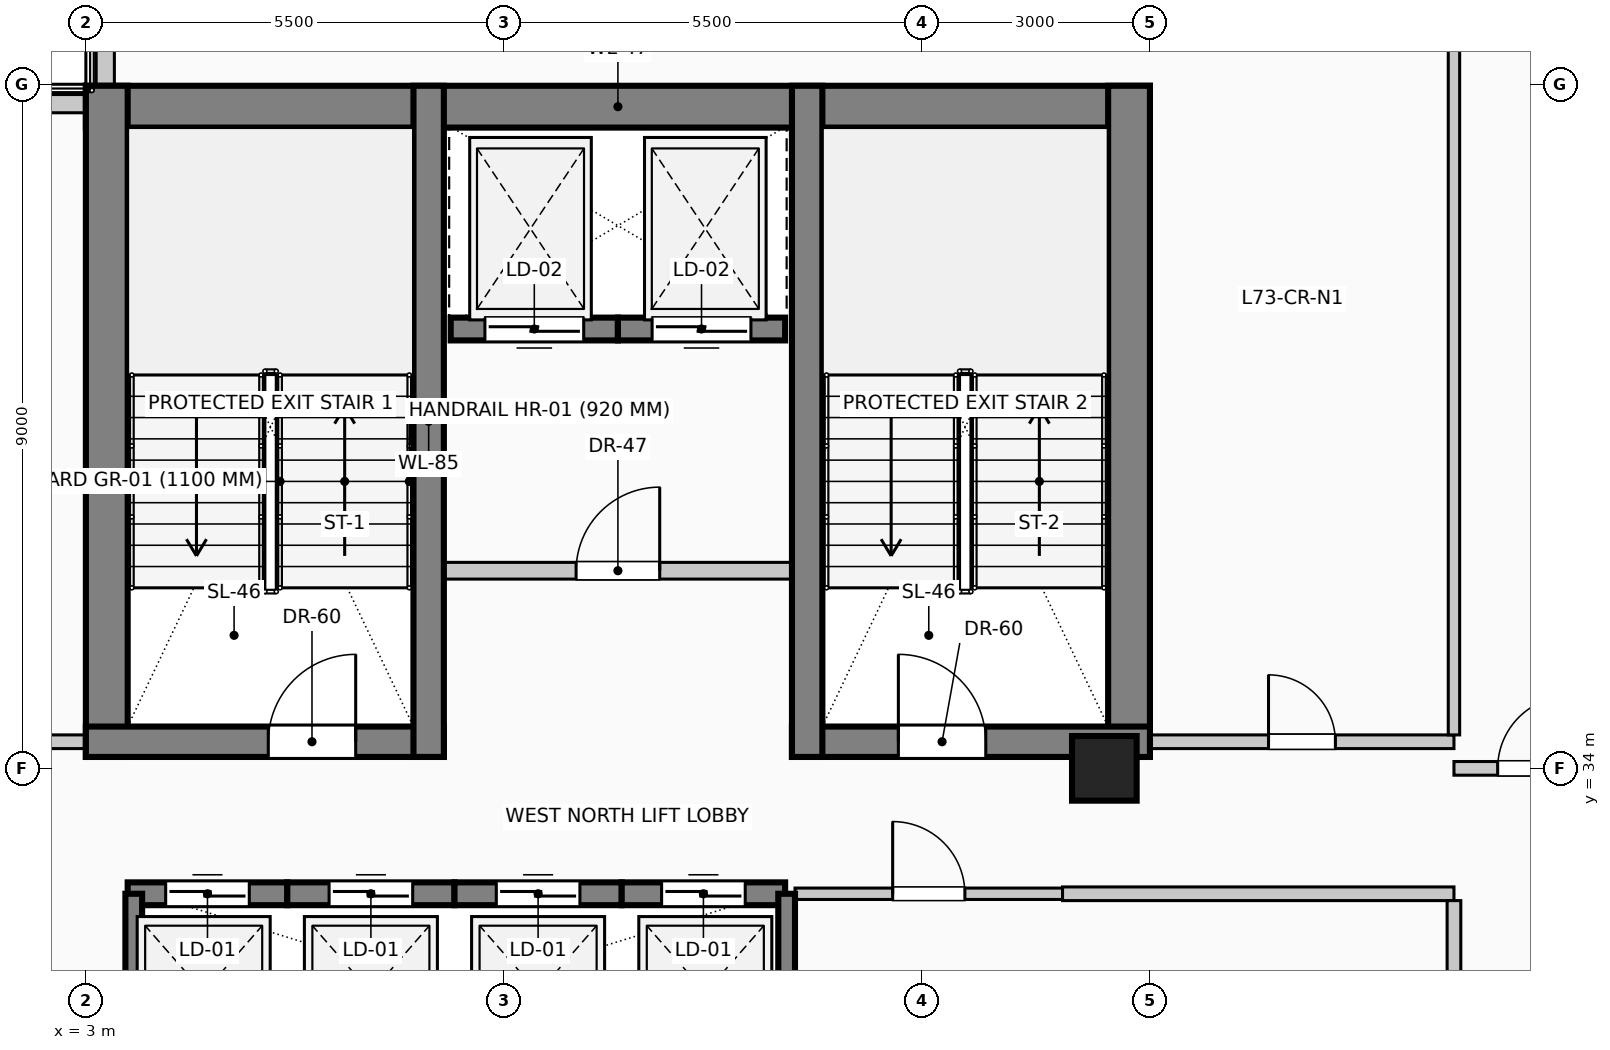
"""IFC4 building model, lengths in metres.
Left out: names, types, materials, properties, quantities, classifications, styles, units other than length and angle.
Written with IfcOpenShell. Run it as: python <this file> out.ifc"""

import sys

from ifc_helpers import new_model, si_unit, direction, frame, frame_2d, origin, origin_2d, place, context, subcontext, project, spatial, rectangle, circle, extrude, element, fill, save


model = new_model("IFC4")
c1 = context("Model", 3, precision=1e-05, world=origin(), true_north=direction((0.0, 1.0)))
c2 = subcontext(c1, "Body", "Model", "MODEL_VIEW")
j1 = project(units=[si_unit("LENGTHUNIT", "METRE"), si_unit("PLANEANGLEUNIT", "RADIAN")], contexts=[c1])
p1 = place(None, origin())
s1 = spatial("IfcSite", under=j1, at=p1, CompositionType="ELEMENT")
p2 = place(p1, origin())
s2 = spatial("IfcBuilding", under=s1, at=p2, CompositionType="ELEMENT")
p3 = place(p2, frame((0.0, 0.0, 301.0)))
s3 = spatial("IfcBuildingStorey", under=s2, at=p3, CompositionType="ELEMENT", Elevation=301.0)
p4 = place(p3, frame((3.0, 42.705, 0.0), z_axis=(0.0, 0.0, 1.0), x_axis=(1.0, 0.0, 0.0)))
e1 = element("IfcWall", 1, at=p4, inside=s3, PredefinedType="SHEAR", context=c2, shape_type="SweptSolid", body=[
    extrude(rectangle(XDim=14.0, YDim=0.55, at=frame_2d((7.0, 0.0))), origin(), (0.0, 0.0, 1.0), 4.0),
])
for number, where, z_axis, x_axis in (
    (2, (3.275, 34.15, 0.0), (0.0, 0.0, 1.0), (0.0, 1.0, 0.0)),
    (3, (16.725, 34.15, 0.0), (0.0, 0.0, 1.0), (0.0, 1.0, 0.0)),
):
    element("IfcWall", number, at=place(p3, frame(where, z_axis=z_axis, x_axis=x_axis)), inside=s3, PredefinedType="SHEAR", context=c2, shape_type="SweptSolid", body=[
        extrude(rectangle(XDim=8.83, YDim=0.55, at=frame_2d((4.415, 0.0))), origin(), (0.0, 0.0, 1.0), 4.0),
    ])
p5 = place(p3, frame((3.0, 34.35, 0.0), z_axis=(0.0, 0.0, 1.0), x_axis=(1.0, 0.0, 0.0)))
e4 = element("IfcWall", 4, at=p5, inside=s3, PredefinedType="SHEAR", context=c2, shape_type="SweptSolid", body=[
    extrude(rectangle(XDim=4.71, YDim=0.4, at=frame_2d((2.355, 0.0))), origin(), (0.0, 0.0, 1.0), 4.0),
])
p6 = place(p5, frame((2.4, 0.0, 0.0)))
e5 = element("IfcOpeningElement", 5, at=p6, cuts=e4, PredefinedType="OPENING", context=c2, shape_type="SweptSolid", body=[
    extrude(rectangle(XDim=1.15, YDim=2.2, at=frame_2d((0.575, 1.1))), frame((0.0, 0.21, 0.0), z_axis=(0.0, -1.0, 0.0), x_axis=(1.0, 0.0, 0.0)), (0.0, 0.0, 1.0), 0.42),
])
p7 = place(p3, frame((12.29, 34.35, 0.0), z_axis=(0.0, 0.0, 1.0), x_axis=(1.0, 0.0, 0.0)))
e6 = element("IfcWall", 6, at=p7, inside=s3, PredefinedType="SHEAR", context=c2, shape_type="SweptSolid", body=[
    extrude(rectangle(XDim=4.71, YDim=0.4, at=frame_2d((2.355, 0.0))), origin(), (0.0, 0.0, 1.0), 4.0),
])
p8 = place(p7, frame((1.4, 0.0, 0.0)))
e7 = element("IfcOpeningElement", 7, at=p8, cuts=e6, PredefinedType="OPENING", context=c2, shape_type="SweptSolid", body=[
    extrude(rectangle(XDim=1.15, YDim=2.2, at=frame_2d((0.575, 1.1))), frame((0.0, 0.21, 0.0), z_axis=(0.0, -1.0, 0.0), x_axis=(1.0, 0.0, 0.0)), (0.0, 0.0, 1.0), 0.42),
])
for number, where, z_axis, x_axis in (
    (8, (7.51, 34.15, 0.0), (0.0, 0.0, 1.0), (0.0, 1.0, 0.0)),
    (9, (12.49, 34.15, 0.0), (0.0, 0.0, 1.0), (0.0, 1.0, 0.0)),
):
    element("IfcWall", number, at=place(p3, frame(where, z_axis=z_axis, x_axis=x_axis)), inside=s3, PredefinedType="SHEAR", context=c2, shape_type="SweptSolid", body=[
        extrude(rectangle(XDim=8.83, YDim=0.4, at=frame_2d((4.415, 0.0))), origin(), (0.0, 0.0, 1.0), 4.0),
    ])
p9 = place(p3, frame((16.4, 34.0, 0.0), z_axis=(0.0, 0.0, 1.0), x_axis=(1.0, 0.0, 0.0)))
e10 = element("IfcColumn", 10, at=p9, inside=s3, PredefinedType="COLUMN", context=c2, shape_type="SweptSolid", body=[
    extrude(circle(Radius=0.425, at=origin_2d()), origin(), (0.0, 0.0, 1.0), 4.0),
])
p10 = place(p3, frame((0.6, 42.745, 0.0), z_axis=(0.0, 0.0, 1.0), x_axis=(1.0, 0.0, 0.0)))
e11 = element("IfcWall", 11, at=p10, inside=s3, PredefinedType="SOLIDWALL", context=c2, shape_type="SweptSolid", body=[
    extrude(rectangle(XDim=2.395, YDim=0.24, at=frame_2d((1.198, 0.0))), origin(), (0.0, 0.0, 1.0), 3.775),
])
p11 = place(p3, frame((3.255, 42.985, 0.0), z_axis=(0.0, 0.0, 1.0), x_axis=(0.0, 1.0, 0.0)))
e12 = element("IfcWall", 12, at=p11, inside=s3, PredefinedType="SOLIDWALL", context=c2, shape_type="SweptSolid", body=[
    extrude(rectangle(XDim=2.415, YDim=0.24, at=frame_2d((1.208, 0.0))), origin(), (0.0, 0.0, 1.0), 3.775),
])
p12 = place(p3, frame((3.55, 32.35, 0.0), z_axis=(0.0, 0.0, 1.0), x_axis=(1.0, 0.0, 0.0)))
e13 = element("IfcWall", 13, at=p12, inside=s3, PredefinedType="SOLIDWALL", context=c2, shape_type="SweptSolid", body=[
    extrude(rectangle(XDim=2.1, YDim=0.3, at=frame_2d((1.05, 0.0))), origin(), (0.0, 0.0, 1.0), 4.0),
])
p13 = place(p12, frame((0.5, 0.0, 0.0)))
e14 = element("IfcOpeningElement", 14, at=p13, cuts=e13, PredefinedType="OPENING", context=c2, shape_type="SweptSolid", body=[
    extrude(rectangle(XDim=1.1, YDim=2.2, at=frame_2d((0.55, 1.1))), frame((0.0, 0.16, 0.0), z_axis=(0.0, -1.0, 0.0), x_axis=(1.0, 0.0, 0.0)), (0.0, 0.0, 1.0), 0.32),
])
p14 = place(p3, frame((5.65, 32.35, 0.0), z_axis=(0.0, 0.0, 1.0), x_axis=(1.0, 0.0, 0.0)))
e15 = element("IfcWall", 15, at=p14, inside=s3, PredefinedType="SOLIDWALL", context=c2, shape_type="SweptSolid", body=[
    extrude(rectangle(XDim=2.2, YDim=0.3, at=frame_2d((1.1, 0.0))), origin(), (0.0, 0.0, 1.0), 4.0),
])
p15 = place(p14, frame((0.55, 0.0, 0.0)))
e16 = element("IfcOpeningElement", 16, at=p15, cuts=e15, PredefinedType="OPENING", context=c2, shape_type="SweptSolid", body=[
    extrude(rectangle(XDim=1.1, YDim=2.2, at=frame_2d((0.55, 1.1))), frame((0.0, 0.16, 0.0), z_axis=(0.0, -1.0, 0.0), x_axis=(1.0, 0.0, 0.0)), (0.0, 0.0, 1.0), 0.32),
])
p16 = place(p3, frame((7.85, 32.35, 0.0), z_axis=(0.0, 0.0, 1.0), x_axis=(1.0, 0.0, 0.0)))
e17 = element("IfcWall", 17, at=p16, inside=s3, PredefinedType="SOLIDWALL", context=c2, shape_type="SweptSolid", body=[
    extrude(rectangle(XDim=2.2, YDim=0.3, at=frame_2d((1.1, 0.0))), origin(), (0.0, 0.0, 1.0), 4.0),
])
p17 = place(p16, frame((0.55, 0.0, 0.0)))
e18 = element("IfcOpeningElement", 18, at=p17, cuts=e17, PredefinedType="OPENING", context=c2, shape_type="SweptSolid", body=[
    extrude(rectangle(XDim=1.1, YDim=2.2, at=frame_2d((0.55, 1.1))), frame((0.0, 0.16, 0.0), z_axis=(0.0, -1.0, 0.0), x_axis=(1.0, 0.0, 0.0)), (0.0, 0.0, 1.0), 0.32),
])
p18 = place(p3, frame((10.05, 32.35, 0.0), z_axis=(0.0, 0.0, 1.0), x_axis=(1.0, 0.0, 0.0)))
e19 = element("IfcWall", 19, at=p18, inside=s3, PredefinedType="SOLIDWALL", context=c2, shape_type="SweptSolid", body=[
    extrude(rectangle(XDim=2.15, YDim=0.3, at=frame_2d((1.075, 0.0))), origin(), (0.0, 0.0, 1.0), 4.0),
])
p19 = place(p18, frame((0.525, 0.0, 0.0)))
e20 = element("IfcOpeningElement", 20, at=p19, cuts=e19, PredefinedType="OPENING", context=c2, shape_type="SweptSolid", body=[
    extrude(rectangle(XDim=1.1, YDim=2.2, at=frame_2d((0.55, 1.1))), frame((0.0, 0.16, 0.0), z_axis=(0.0, -1.0, 0.0), x_axis=(1.0, 0.0, 0.0)), (0.0, 0.0, 1.0), 0.32),
])
p20 = place(p3, frame((10.0, 39.78, 0.0), z_axis=(0.0, 0.0, 1.0), x_axis=(-1.0, 0.0, 0.0)))
e21 = element("IfcWall", 21, at=p20, inside=s3, PredefinedType="SOLIDWALL", context=c2, shape_type="SweptSolid", body=[
    extrude(rectangle(XDim=2.2, YDim=0.3, at=frame_2d((1.1, 0.0))), origin(), (0.0, 0.0, 1.0), 4.0),
])
p21 = place(p20, frame((0.45, 0.0, 0.0)))
e22 = element("IfcOpeningElement", 22, at=p21, cuts=e21, PredefinedType="OPENING", context=c2, shape_type="SweptSolid", body=[
    extrude(rectangle(XDim=1.3, YDim=2.25, at=frame_2d((0.65, 1.125))), frame((0.0, 0.16, 0.0), z_axis=(0.0, -1.0, 0.0), x_axis=(1.0, 0.0, 0.0)), (0.0, 0.0, 1.0), 0.32),
])
p22 = place(p3, frame((12.2, 39.78, 0.0), z_axis=(0.0, 0.0, 1.0), x_axis=(-1.0, 0.0, 0.0)))
e23 = element("IfcWall", 23, at=p22, inside=s3, PredefinedType="SOLIDWALL", context=c2, shape_type="SweptSolid", body=[
    extrude(rectangle(XDim=2.2, YDim=0.3, at=frame_2d((1.1, 0.0))), origin(), (0.0, 0.0, 1.0), 4.0),
])
p23 = place(p22, frame((0.45, 0.0, 0.0)))
e24 = element("IfcOpeningElement", 24, at=p23, cuts=e23, PredefinedType="OPENING", context=c2, shape_type="SweptSolid", body=[
    extrude(rectangle(XDim=1.3, YDim=2.25, at=frame_2d((0.65, 1.125))), frame((0.0, 0.16, 0.0), z_axis=(0.0, -1.0, 0.0), x_axis=(1.0, 0.0, 0.0)), (0.0, 0.0, 1.0), 0.32),
])
p24 = place(p3, frame((3.63, 26.8, 0.0), z_axis=(0.0, 0.0, 1.0), x_axis=(0.0, 1.0, 0.0)))
e25 = element("IfcWall", 25, at=p24, inside=s3, PredefinedType="SOLIDWALL", context=c2, shape_type="SweptSolid", body=[
    extrude(rectangle(XDim=5.55, YDim=0.22, at=frame_2d((2.775, 0.0))), origin(), (0.0, 0.0, 1.0), 4.0),
])
p25 = place(p3, frame((12.22, 29.75, 0.0), z_axis=(0.0, 0.0, 1.0), x_axis=(0.0, 1.0, 0.0)))
e26 = element("IfcWall", 26, at=p25, inside=s3, PredefinedType="SOLIDWALL", context=c2, shape_type="SweptSolid", body=[
    extrude(rectangle(XDim=2.6, YDim=0.22, at=frame_2d((1.3, 0.0))), origin(), (0.0, 0.0, 1.0), 4.0),
])
p26 = place(p3, frame((7.51, 36.6, 0.0), z_axis=(0.0, 0.0, 1.0), x_axis=(1.0, 0.0, 0.0)))
e27 = element("IfcWall", 27, at=p26, inside=s3, PredefinedType="PARTITIONING", context=c2, shape_type="SweptSolid", body=[
    extrude(rectangle(XDim=4.98, YDim=0.22, at=frame_2d((2.49, 0.0))), origin(), (0.0, 0.0, 1.0), 3.775),
])
p27 = place(p26, frame((1.94, 0.0, 0.0)))
e28 = element("IfcOpeningElement", 28, at=p27, cuts=e27, PredefinedType="OPENING", context=c2, shape_type="SweptSolid", body=[
    extrude(rectangle(XDim=1.1, YDim=2.2, at=frame_2d((0.55, 1.1))), frame((0.0, 0.12, 0.0), z_axis=(0.0, -1.0, 0.0), x_axis=(1.0, 0.0, 0.0)), (0.0, 0.0, 1.0), 0.24),
])
p28 = place(p3, frame((12.33, 32.35, 0.0), z_axis=(0.0, 0.0, 1.0), x_axis=(1.0, 0.0, 0.0)))
e29 = element("IfcWall", 29, at=p28, inside=s3, PredefinedType="PARTITIONING", context=c2, shape_type="SweptSolid", body=[
    extrude(rectangle(XDim=3.52, YDim=0.15, at=frame_2d((1.76, 0.0))), origin(), (0.0, 0.0, 1.0), 3.775),
])
p29 = place(p28, frame((1.285, 0.0, 0.0)))
e30 = element("IfcOpeningElement", 30, at=p29, cuts=e29, PredefinedType="OPENING", context=c2, shape_type="SweptSolid", body=[
    extrude(rectangle(XDim=0.95, YDim=2.15, at=frame_2d((0.475, 1.075))), frame((0.0, 0.085, 0.0), z_axis=(0.0, -1.0, 0.0), x_axis=(1.0, 0.0, 0.0)), (0.0, 0.0, 1.0), 0.17),
])
p30 = place(p3, frame((15.85, 32.35, 0.0), z_axis=(0.0, 0.0, 1.0), x_axis=(1.0, 0.0, 0.0)))
e31 = element("IfcWall", 31, at=p30, inside=s3, PredefinedType="PARTITIONING", context=c2, shape_type="SweptSolid", body=[
    extrude(rectangle(XDim=5.15, YDim=0.18, at=frame_2d((2.575, 0.0))), origin(), (0.0, 0.0, 1.0), 3.775),
])
p31 = place(p3, frame((21.0, 34.0, 0.0), z_axis=(0.0, 0.0, 1.0), x_axis=(1.0, 0.0, 0.0)))
e32 = element("IfcWall", 32, at=p31, inside=s3, PredefinedType="PARTITIONING", context=c2, shape_type="SweptSolid", body=[
    extrude(rectangle(XDim=2.1, YDim=0.18, at=frame_2d((1.05, 0.0))), origin(), (0.0, 0.0, 1.0), 3.27),
])
p32 = place(p31, frame((0.575, 0.0, 0.0)))
e33 = element("IfcOpeningElement", 33, at=p32, cuts=e32, PredefinedType="OPENING", context=c2, shape_type="SweptSolid", body=[
    extrude(rectangle(XDim=0.95, YDim=2.15, at=frame_2d((0.475, 1.075))), frame((0.0, 0.1, 0.0), z_axis=(0.0, -1.0, 0.0), x_axis=(1.0, 0.0, 0.0)), (0.0, 0.0, 1.0), 0.2),
])
p33 = place(p3, frame((1.05, 34.35, 0.0), z_axis=(0.0, 0.0, 1.0), x_axis=(1.0, 0.0, 0.0)))
e34 = element("IfcWall", 34, at=p33, inside=s3, PredefinedType="PARTITIONING", context=c2, shape_type="SweptSolid", body=[
    extrude(rectangle(XDim=1.95, YDim=0.18, at=frame_2d((0.975, 0.0))), origin(), (0.0, 0.0, 1.0), 3.775),
])
p34 = place(p3, frame((17.0, 34.35, 0.0), z_axis=(0.0, 0.0, 1.0), x_axis=(1.0, 0.0, 0.0)))
e35 = element("IfcWall", 35, at=p34, inside=s3, PredefinedType="PARTITIONING", context=c2, shape_type="SweptSolid", body=[
    extrude(rectangle(XDim=4.0, YDim=0.18, at=frame_2d((2.0, 0.0))), origin(), (0.0, 0.0, 1.0), 3.775),
])
p35 = place(p34, frame((1.56, 0.0, 0.0)))
e36 = element("IfcOpeningElement", 36, at=p35, cuts=e35, PredefinedType="OPENING", context=c2, shape_type="SweptSolid", body=[
    extrude(rectangle(XDim=0.88, YDim=2.1, at=frame_2d((0.44, 1.05))), frame((0.0, 0.1, 0.0), z_axis=(0.0, -1.0, 0.0), x_axis=(1.0, 0.0, 0.0)), (0.0, 0.0, 1.0), 0.2),
])
p36 = place(p3, frame((21.0, 24.875, 0.0), z_axis=(0.0, 0.0, 1.0), x_axis=(0.0, 1.0, 0.0)))
e37 = element("IfcWall", 37, at=p36, inside=s3, PredefinedType="PARTITIONING", context=c2, shape_type="SweptSolid", body=[
    extrude(rectangle(XDim=7.385, YDim=0.18, at=frame_2d((3.692, 0.0))), origin(), (0.0, 0.0, 1.0), 3.775),
])
p37 = place(p3, frame((21.0, 34.44, 0.0), z_axis=(0.0, 0.0, 1.0), x_axis=(0.0, 1.0, 0.0)))
e38 = element("IfcWall", 38, at=p37, inside=s3, PredefinedType="PARTITIONING", context=c2, shape_type="SweptSolid", body=[
    extrude(rectangle(XDim=10.84, YDim=0.15, at=frame_2d((5.42, 0.0))), origin(), (0.0, 0.0, 1.0), 3.775),
])
p38 = place(p13, origin())
e39 = element("IfcDoor", 39, at=p38, inside=s3, OperationType="SLIDING_TO_LEFT", PredefinedType="DOOR", context=c2, shape_type="SweptSolid", body=[
    extrude(rectangle(XDim=1.1, YDim=2.2, at=frame_2d((0.55, 1.1))), frame((0.0, 0.025, 0.0), z_axis=(0.0, -1.0, 0.0), x_axis=(1.0, 0.0, 0.0)), (0.0, 0.0, 1.0), 0.05),
])
fill(e14, e39)
p39 = place(p15, origin())
e40 = element("IfcDoor", 40, at=p39, inside=s3, OperationType="SLIDING_TO_RIGHT", PredefinedType="DOOR", context=c2, shape_type="SweptSolid", body=[
    extrude(rectangle(XDim=1.1, YDim=2.2, at=frame_2d((0.55, 1.1))), frame((0.0, 0.025, 0.0), z_axis=(0.0, -1.0, 0.0), x_axis=(1.0, 0.0, 0.0)), (0.0, 0.0, 1.0), 0.05),
])
fill(e16, e40)
p40 = place(p17, origin())
e41 = element("IfcDoor", 41, at=p40, inside=s3, OperationType="SLIDING_TO_LEFT", PredefinedType="DOOR", context=c2, shape_type="SweptSolid", body=[
    extrude(rectangle(XDim=1.1, YDim=2.2, at=frame_2d((0.55, 1.1))), frame((0.0, 0.025, 0.0), z_axis=(0.0, -1.0, 0.0), x_axis=(1.0, 0.0, 0.0)), (0.0, 0.0, 1.0), 0.05),
])
fill(e18, e41)
p41 = place(p19, origin())
e42 = element("IfcDoor", 42, at=p41, inside=s3, OperationType="SLIDING_TO_RIGHT", PredefinedType="DOOR", context=c2, shape_type="SweptSolid", body=[
    extrude(rectangle(XDim=1.1, YDim=2.2, at=frame_2d((0.55, 1.1))), frame((0.0, 0.025, 0.0), z_axis=(0.0, -1.0, 0.0), x_axis=(1.0, 0.0, 0.0)), (0.0, 0.0, 1.0), 0.05),
])
fill(e20, e42)
p42 = place(p21, origin())
e43 = element("IfcDoor", 43, at=p42, inside=s3, OperationType="SLIDING_TO_LEFT", PredefinedType="DOOR", context=c2, shape_type="SweptSolid", body=[
    extrude(rectangle(XDim=1.3, YDim=2.25, at=frame_2d((0.65, 1.125))), frame((0.0, 0.025, 0.0), z_axis=(0.0, -1.0, 0.0), x_axis=(1.0, 0.0, 0.0)), (0.0, 0.0, 1.0), 0.05),
])
fill(e22, e43)
p43 = place(p23, origin())
e44 = element("IfcDoor", 44, at=p43, inside=s3, OperationType="SLIDING_TO_RIGHT", PredefinedType="DOOR", context=c2, shape_type="SweptSolid", body=[
    extrude(rectangle(XDim=1.3, YDim=2.25, at=frame_2d((0.65, 1.125))), frame((0.0, 0.025, 0.0), z_axis=(0.0, -1.0, 0.0), x_axis=(1.0, 0.0, 0.0)), (0.0, 0.0, 1.0), 0.05),
])
fill(e24, e44)
p44 = place(p6, origin())
e45 = element("IfcDoor", 45, at=p44, inside=s3, OperationType="SINGLE_SWING_RIGHT", PredefinedType="DOOR", context=c2, shape_type="SweptSolid", body=[
    extrude(rectangle(XDim=1.15, YDim=2.2, at=frame_2d((0.575, 1.1))), frame((0.0, 0.025, 0.0), z_axis=(0.0, -1.0, 0.0), x_axis=(1.0, 0.0, 0.0)), (0.0, 0.0, 1.0), 0.05),
])
fill(e5, e45)
p45 = place(p8, origin())
e46 = element("IfcDoor", 46, at=p45, inside=s3, OperationType="SINGLE_SWING_LEFT", PredefinedType="DOOR", context=c2, shape_type="SweptSolid", body=[
    extrude(rectangle(XDim=1.15, YDim=2.2, at=frame_2d((0.575, 1.1))), frame((0.0, 0.025, 0.0), z_axis=(0.0, -1.0, 0.0), x_axis=(1.0, 0.0, 0.0)), (0.0, 0.0, 1.0), 0.05),
])
fill(e7, e46)
p46 = place(p27, origin())
e47 = element("IfcDoor", 47, at=p46, inside=s3, OperationType="SINGLE_SWING_RIGHT", PredefinedType="DOOR", context=c2, shape_type="SweptSolid", body=[
    extrude(rectangle(XDim=1.1, YDim=2.2, at=frame_2d((0.55, 1.1))), frame((0.0, 0.025, 0.0), z_axis=(0.0, -1.0, 0.0), x_axis=(1.0, 0.0, 0.0)), (0.0, 0.0, 1.0), 0.05),
])
fill(e28, e47)
p47 = place(p29, origin())
e48 = element("IfcDoor", 48, at=p47, inside=s3, OperationType="SINGLE_SWING_LEFT", PredefinedType="DOOR", context=c2, shape_type="SweptSolid", body=[
    extrude(rectangle(XDim=0.95, YDim=2.15, at=frame_2d((0.475, 1.075))), frame((0.0, 0.025, 0.0), z_axis=(0.0, -1.0, 0.0), x_axis=(1.0, 0.0, 0.0)), (0.0, 0.0, 1.0), 0.05),
])
fill(e30, e48)
p48 = place(p32, origin())
e49 = element("IfcDoor", 49, at=p48, inside=s3, OperationType="SINGLE_SWING_RIGHT", PredefinedType="DOOR", context=c2, shape_type="SweptSolid", body=[
    extrude(rectangle(XDim=0.95, YDim=2.15, at=frame_2d((0.475, 1.075))), frame((0.0, 0.025, 0.0), z_axis=(0.0, -1.0, 0.0), x_axis=(1.0, 0.0, 0.0)), (0.0, 0.0, 1.0), 0.05),
])
fill(e33, e49)
p49 = place(p35, origin())
e50 = element("IfcDoor", 50, at=p49, inside=s3, OperationType="SINGLE_SWING_LEFT", PredefinedType="DOOR", context=c2, shape_type="SweptSolid", body=[
    extrude(rectangle(XDim=0.88, YDim=2.1, at=frame_2d((0.44, 1.05))), frame((0.0, 0.025, 0.0), z_axis=(0.0, -1.0, 0.0), x_axis=(1.0, 0.0, 0.0)), (0.0, 0.0, 1.0), 0.05),
])
fill(e36, e50)
save(model, sys.argv[1])
